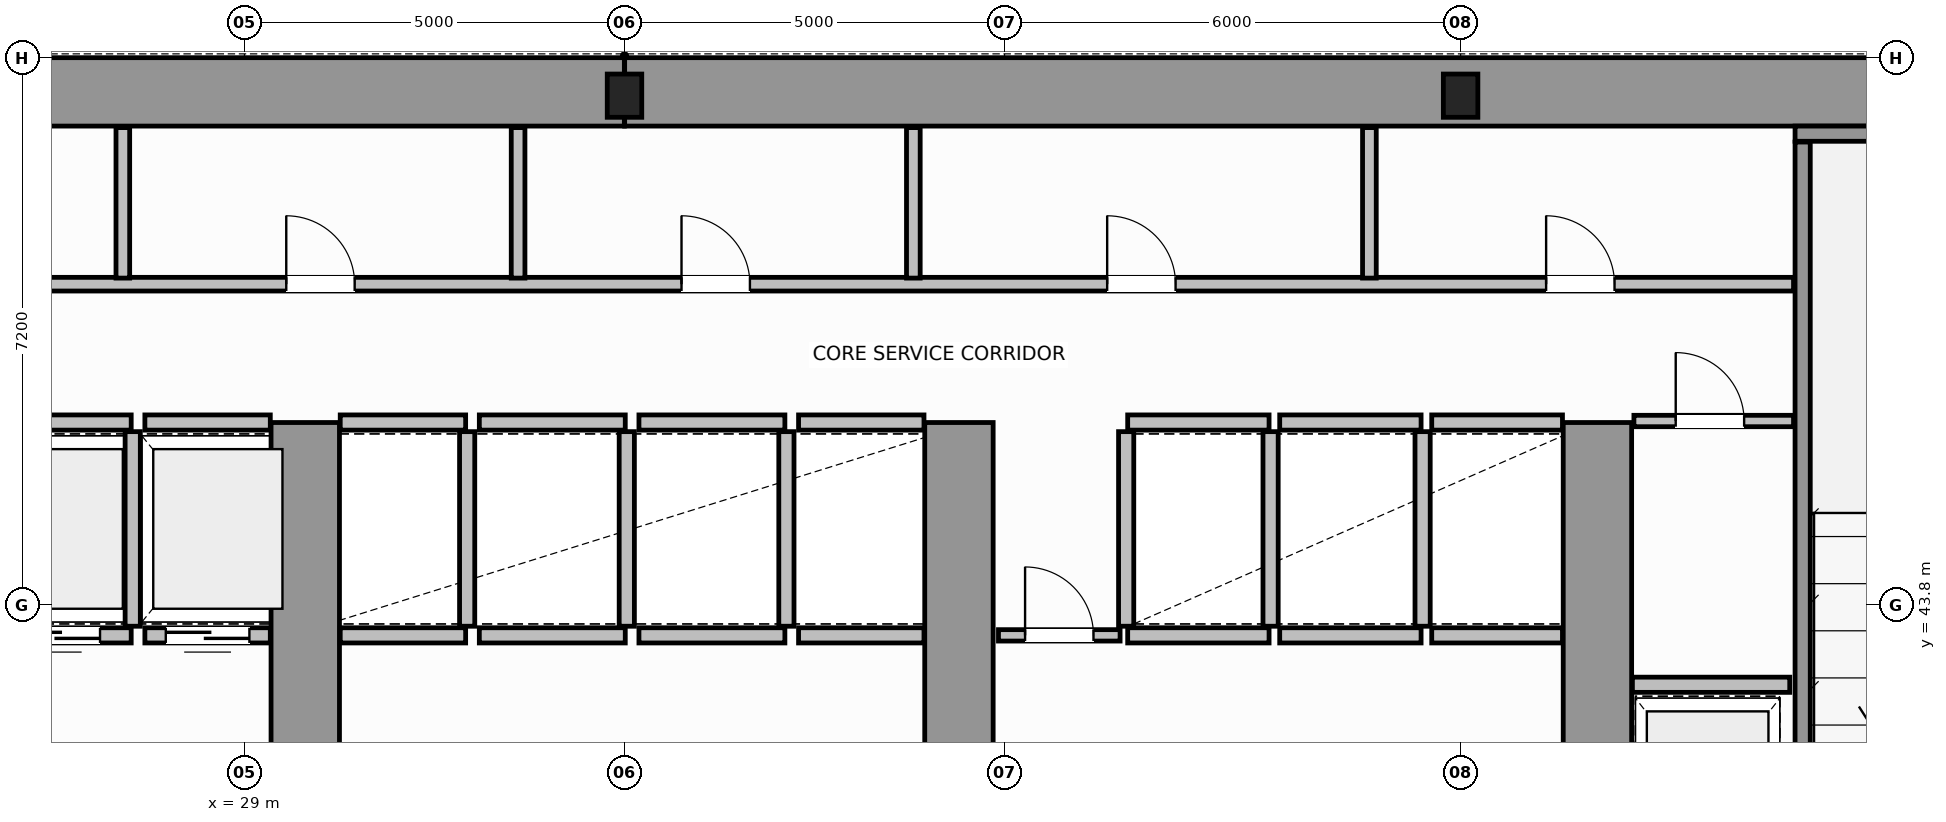
"""IFC4 building model, lengths in metres.
Left out: names, types, materials, properties, quantities, classifications, styles, units other than length and angle.
Written with IfcOpenShell. Run it as: python <this file> out.ifc"""

import sys

from ifc_helpers import new_model, si_unit, direction, frame, frame_2d, origin, origin_2d, place, context, subcontext, project, spatial, rectangle, i_section, extrude, source, transform, mapped, element, fill, save


model = new_model("IFC4")
c1 = context("Model", 3, precision=1e-05, world=origin(), true_north=direction((0.0, 1.0)))
c2 = subcontext(c1, "Body", "Model", "MODEL_VIEW")
j1 = project(units=[si_unit("LENGTHUNIT", "METRE"), si_unit("PLANEANGLEUNIT", "RADIAN")], contexts=[c1])
p1 = place(None, origin())
s1 = spatial("IfcSite", under=j1, at=p1, CompositionType="ELEMENT")
p2 = place(p1, origin())
s2 = spatial("IfcBuilding", under=s1, at=p2, CompositionType="ELEMENT")
p3 = place(p2, frame((0.0, 0.0, 18.8)))
s3 = spatial("IfcBuildingStorey", under=s2, at=p3, CompositionType="ELEMENT", Elevation=18.8)
m1 = source(origin(), c2, "Body", "SweptSolid", [
    extrude(i_section(OverallWidth=0.454, OverallDepth=0.569, WebThickness=0.078, FlangeThickness=0.08, FilletRadius=0.015, at=origin_2d()), origin(), (0.0, 0.0, 1.0), 3.8),
])
for number, where, z_axis, x_axis in (
    (1, (34.0, 50.5, 0.0), (0.0, 0.0, 1.0), (1.0, 0.0, 0.0)),
    (2, (45.0, 50.5, 0.0), (0.0, 0.0, 1.0), (1.0, 0.0, 0.0)),
):
    element("IfcColumn", number, at=place(p3, frame(where, z_axis=z_axis, x_axis=x_axis)), inside=s3, PredefinedType="COLUMN", context=c2, shape_type="MappedRepresentation", body=[
        mapped(m1, transform((0.0, 0.0, 0.0), scale=1.0)),
    ])
for number, where, z_axis, x_axis in (
    (3, (14.454, 50.55, 0.0), (0.0, 0.0, 1.0), (1.0, 0.0, 0.0)),
    (4, (34.002, 50.55, 0.0), (0.0, 0.0, 1.0), (1.0, 0.0, 0.0)),
):
    element("IfcWall", number, at=place(p3, frame(where, z_axis=z_axis, x_axis=x_axis)), inside=s3, PredefinedType="SHEAR", context=c2, shape_type="SweptSolid", body=[
        extrude(rectangle(XDim=19.544, YDim=0.9, at=frame_2d((9.772, 0.0))), origin(), (0.0, 0.0, 1.0), 3.8),
    ])
for number, where, z_axis, x_axis in (
    (5, (29.8, 36.97, 0.0), (0.0, 0.0, 1.0), (0.0, 1.0, 0.0)),
    (6, (38.4, 36.97, 0.0), (0.0, 0.0, 1.0), (0.0, 1.0, 0.0)),
    (7, (46.8, 36.97, 0.0), (0.0, 0.0, 1.0), (0.0, 1.0, 0.0)),
):
    element("IfcWall", number, at=place(p3, frame(where, z_axis=z_axis, x_axis=x_axis)), inside=s3, PredefinedType="SHEAR", context=c2, shape_type="SweptSolid", body=[
        extrude(rectangle(XDim=9.23, YDim=0.9, at=frame_2d((4.615, 0.0))), origin(), (0.0, 0.0, 1.0), 3.8),
    ])
p4 = place(p3, frame((49.4, 50.0, 0.0), z_axis=(0.0, 0.0, 1.0), x_axis=(1.0, 0.0, 0.0)))
e8 = element("IfcWall", 8, at=p4, inside=s3, PredefinedType="SOLIDWALL", context=c2, shape_type="SweptSolid", body=[
    extrude(rectangle(XDim=4.15, YDim=0.2, at=frame_2d((2.075, 0.0))), origin(), (0.0, 0.0, 1.0), 3.8),
])
p5 = place(p3, frame((49.5, 39.96, 0.0), z_axis=(0.0, 0.0, 1.0), x_axis=(0.0, 1.0, 0.0)))
e9 = element("IfcWall", 9, at=p5, inside=s3, PredefinedType="SOLIDWALL", context=c2, shape_type="SweptSolid", body=[
    extrude(rectangle(XDim=9.93, YDim=0.2, at=frame_2d((4.965, 0.0))), origin(), (0.0, 0.0, 1.0), 3.8),
])
p6 = place(p3, frame((25.59, 43.4, 0.0), z_axis=(0.0, 0.0, 1.0), x_axis=(1.0, 0.0, 0.0)))
e10 = element("IfcWall", 10, at=p6, inside=s3, PredefinedType="SOLIDWALL", context=c2, shape_type="SweptSolid", body=[
    extrude(rectangle(XDim=1.92, YDim=0.2, at=frame_2d((0.96, 0.0))), origin(), (0.0, 0.0, 1.0), 3.58),
])
p7 = place(p6, frame((0.41, 0.0, 0.0)))
e11 = element("IfcOpeningElement", 11, at=p7, cuts=e10, PredefinedType="OPENING", context=c2, shape_type="SweptSolid", body=[
    extrude(rectangle(XDim=1.1, YDim=2.15, at=frame_2d((0.55, 1.075))), frame((0.0, 0.11, 0.0), z_axis=(0.0, -1.0, 0.0), x_axis=(1.0, 0.0, 0.0)), (0.0, 0.0, 1.0), 0.22),
])
p8 = place(p3, frame((25.59, 46.2, 0.0), z_axis=(0.0, 0.0, 1.0), x_axis=(1.0, 0.0, 0.0)))
e12 = element("IfcWall", 12, at=p8, inside=s3, PredefinedType="SOLIDWALL", context=c2, shape_type="SweptSolid", body=[
    extrude(rectangle(XDim=1.92, YDim=0.2, at=frame_2d((0.96, 0.0))), origin(), (0.0, 0.0, 1.0), 3.58),
])
p9 = place(p3, frame((27.53, 43.52, 0.0), z_axis=(0.0, 0.0, 1.0), x_axis=(0.0, 1.0, 0.0)))
e13 = element("IfcWall", 13, at=p9, inside=s3, PredefinedType="SOLIDWALL", context=c2, shape_type="SweptSolid", body=[
    extrude(rectangle(XDim=2.56, YDim=0.2, at=frame_2d((1.28, 0.0))), origin(), (0.0, 0.0, 1.0), 3.58),
])
p10 = place(p3, frame((27.69, 43.4, 0.0), z_axis=(0.0, 0.0, 1.0), x_axis=(1.0, 0.0, 0.0)))
e14 = element("IfcWall", 14, at=p10, inside=s3, PredefinedType="SOLIDWALL", context=c2, shape_type="SweptSolid", body=[
    extrude(rectangle(XDim=1.65, YDim=0.2, at=frame_2d((0.825, 0.0))), origin(), (0.0, 0.0, 1.0), 3.58),
])
p11 = place(p10, frame((0.275, 0.0, 0.0)))
e15 = element("IfcOpeningElement", 15, at=p11, cuts=e14, PredefinedType="OPENING", context=c2, shape_type="SweptSolid", body=[
    extrude(rectangle(XDim=1.1, YDim=2.15, at=frame_2d((0.55, 1.075))), frame((0.0, 0.11, 0.0), z_axis=(0.0, -1.0, 0.0), x_axis=(1.0, 0.0, 0.0)), (0.0, 0.0, 1.0), 0.22),
])
p12 = place(p3, frame((27.69, 46.2, 0.0), z_axis=(0.0, 0.0, 1.0), x_axis=(1.0, 0.0, 0.0)))
e16 = element("IfcWall", 16, at=p12, inside=s3, PredefinedType="SOLIDWALL", context=c2, shape_type="SweptSolid", body=[
    extrude(rectangle(XDim=1.65, YDim=0.2, at=frame_2d((0.825, 0.0))), origin(), (0.0, 0.0, 1.0), 3.58),
])
for number, where, z_axis, x_axis in (
    (17, (30.26, 43.4, 0.0), (0.0, 0.0, 1.0), (1.0, 0.0, 0.0)),
    (18, (30.26, 46.2, 0.0), (0.0, 0.0, 1.0), (1.0, 0.0, 0.0)),
):
    element("IfcWall", number, at=place(p3, frame(where, z_axis=z_axis, x_axis=x_axis)), inside=s3, PredefinedType="SOLIDWALL", context=c2, shape_type="SweptSolid", body=[
        extrude(rectangle(XDim=1.65, YDim=0.2, at=frame_2d((0.825, 0.0))), origin(), (0.0, 0.0, 1.0), 3.58),
    ])
p13 = place(p3, frame((31.93, 43.52, 0.0), z_axis=(0.0, 0.0, 1.0), x_axis=(0.0, 1.0, 0.0)))
e19 = element("IfcWall", 19, at=p13, inside=s3, PredefinedType="SOLIDWALL", context=c2, shape_type="SweptSolid", body=[
    extrude(rectangle(XDim=2.56, YDim=0.2, at=frame_2d((1.28, 0.0))), origin(), (0.0, 0.0, 1.0), 3.58),
])
for number, where, z_axis, x_axis in (
    (20, (32.09, 43.4, 0.0), (0.0, 0.0, 1.0), (1.0, 0.0, 0.0)),
    (21, (32.09, 46.2, 0.0), (0.0, 0.0, 1.0), (1.0, 0.0, 0.0)),
):
    element("IfcWall", number, at=place(p3, frame(where, z_axis=z_axis, x_axis=x_axis)), inside=s3, PredefinedType="SOLIDWALL", context=c2, shape_type="SweptSolid", body=[
        extrude(rectangle(XDim=1.92, YDim=0.2, at=frame_2d((0.96, 0.0))), origin(), (0.0, 0.0, 1.0), 3.58),
    ])
p14 = place(p3, frame((34.03, 43.52, 0.0), z_axis=(0.0, 0.0, 1.0), x_axis=(0.0, 1.0, 0.0)))
e22 = element("IfcWall", 22, at=p14, inside=s3, PredefinedType="SOLIDWALL", context=c2, shape_type="SweptSolid", body=[
    extrude(rectangle(XDim=2.56, YDim=0.2, at=frame_2d((1.28, 0.0))), origin(), (0.0, 0.0, 1.0), 3.58),
])
for number, where, z_axis, x_axis in (
    (23, (34.19, 43.4, 0.0), (0.0, 0.0, 1.0), (1.0, 0.0, 0.0)),
    (24, (34.19, 46.2, 0.0), (0.0, 0.0, 1.0), (1.0, 0.0, 0.0)),
):
    element("IfcWall", number, at=place(p3, frame(where, z_axis=z_axis, x_axis=x_axis)), inside=s3, PredefinedType="SOLIDWALL", context=c2, shape_type="SweptSolid", body=[
        extrude(rectangle(XDim=1.92, YDim=0.2, at=frame_2d((0.96, 0.0))), origin(), (0.0, 0.0, 1.0), 3.58),
    ])
p15 = place(p3, frame((36.13, 43.52, 0.0), z_axis=(0.0, 0.0, 1.0), x_axis=(0.0, 1.0, 0.0)))
e25 = element("IfcWall", 25, at=p15, inside=s3, PredefinedType="SOLIDWALL", context=c2, shape_type="SweptSolid", body=[
    extrude(rectangle(XDim=2.56, YDim=0.2, at=frame_2d((1.28, 0.0))), origin(), (0.0, 0.0, 1.0), 3.58),
])
for number, where, z_axis, x_axis in (
    (26, (36.29, 43.4, 0.0), (0.0, 0.0, 1.0), (1.0, 0.0, 0.0)),
    (27, (36.29, 46.2, 0.0), (0.0, 0.0, 1.0), (1.0, 0.0, 0.0)),
):
    element("IfcWall", number, at=place(p3, frame(where, z_axis=z_axis, x_axis=x_axis)), inside=s3, PredefinedType="SOLIDWALL", context=c2, shape_type="SweptSolid", body=[
        extrude(rectangle(XDim=1.65, YDim=0.2, at=frame_2d((0.825, 0.0))), origin(), (0.0, 0.0, 1.0), 3.58),
    ])
for number, where, z_axis, x_axis in (
    (28, (40.62, 43.4, 0.0), (0.0, 0.0, 1.0), (1.0, 0.0, 0.0)),
    (29, (40.62, 46.2, 0.0), (0.0, 0.0, 1.0), (1.0, 0.0, 0.0)),
):
    element("IfcWall", number, at=place(p3, frame(where, z_axis=z_axis, x_axis=x_axis)), inside=s3, PredefinedType="SOLIDWALL", context=c2, shape_type="SweptSolid", body=[
        extrude(rectangle(XDim=1.86, YDim=0.2, at=frame_2d((0.93, 0.0))), origin(), (0.0, 0.0, 1.0), 3.58),
    ])
for number, where, z_axis, x_axis in (
    (30, (40.6, 43.52, 0.0), (0.0, 0.0, 1.0), (0.0, 1.0, 0.0)),
    (31, (42.5, 43.52, 0.0), (0.0, 0.0, 1.0), (0.0, 1.0, 0.0)),
):
    element("IfcWall", number, at=place(p3, frame(where, z_axis=z_axis, x_axis=x_axis)), inside=s3, PredefinedType="SOLIDWALL", context=c2, shape_type="SweptSolid", body=[
        extrude(rectangle(XDim=2.56, YDim=0.2, at=frame_2d((1.28, 0.0))), origin(), (0.0, 0.0, 1.0), 3.58),
    ])
for number, where, z_axis, x_axis in (
    (32, (42.62, 43.4, 0.0), (0.0, 0.0, 1.0), (1.0, 0.0, 0.0)),
    (33, (42.62, 46.2, 0.0), (0.0, 0.0, 1.0), (1.0, 0.0, 0.0)),
):
    element("IfcWall", number, at=place(p3, frame(where, z_axis=z_axis, x_axis=x_axis)), inside=s3, PredefinedType="SOLIDWALL", context=c2, shape_type="SweptSolid", body=[
        extrude(rectangle(XDim=1.86, YDim=0.2, at=frame_2d((0.93, 0.0))), origin(), (0.0, 0.0, 1.0), 3.58),
    ])
p16 = place(p3, frame((44.5, 43.52, 0.0), z_axis=(0.0, 0.0, 1.0), x_axis=(0.0, 1.0, 0.0)))
e34 = element("IfcWall", 34, at=p16, inside=s3, PredefinedType="SOLIDWALL", context=c2, shape_type="SweptSolid", body=[
    extrude(rectangle(XDim=2.56, YDim=0.2, at=frame_2d((1.28, 0.0))), origin(), (0.0, 0.0, 1.0), 3.58),
])
for number, where, z_axis, x_axis in (
    (35, (44.62, 43.4, 0.0), (0.0, 0.0, 1.0), (1.0, 0.0, 0.0)),
    (36, (44.62, 46.2, 0.0), (0.0, 0.0, 1.0), (1.0, 0.0, 0.0)),
):
    element("IfcWall", number, at=place(p3, frame(where, z_axis=z_axis, x_axis=x_axis)), inside=s3, PredefinedType="SOLIDWALL", context=c2, shape_type="SweptSolid", body=[
        extrude(rectangle(XDim=1.72, YDim=0.2, at=frame_2d((0.86, 0.0))), origin(), (0.0, 0.0, 1.0), 3.58),
    ])
p17 = place(p3, frame((47.26, 42.75, 0.0), z_axis=(0.0, 0.0, 1.0), x_axis=(1.0, 0.0, 0.0)))
e37 = element("IfcWall", 37, at=p17, inside=s3, PredefinedType="SOLIDWALL", context=c2, shape_type="SweptSolid", body=[
    extrude(rectangle(XDim=2.07, YDim=0.2, at=frame_2d((1.035, 0.0))), origin(), (0.0, 0.0, 1.0), 3.58),
])
p18 = place(p3, frame((47.28, 46.22, 0.0), z_axis=(0.0, 0.0, 1.0), x_axis=(1.0, 0.0, 0.0)))
e38 = element("IfcWall", 38, at=p18, inside=s3, PredefinedType="PARTITIONING", context=c2, shape_type="SweptSolid", body=[
    extrude(rectangle(XDim=2.1, YDim=0.15, at=frame_2d((1.05, 0.0))), origin(), (0.0, 0.0, 1.0), 3.58),
])
p19 = place(p18, frame((0.55, 0.0, 0.0)))
e39 = element("IfcOpeningElement", 39, at=p19, cuts=e38, PredefinedType="OPENING", context=c2, shape_type="SweptSolid", body=[
    extrude(rectangle(XDim=0.9, YDim=2.1, at=frame_2d((0.45, 1.05))), frame((0.0, 0.085, 0.0), z_axis=(0.0, -1.0, 0.0), x_axis=(1.0, 0.0, 0.0)), (0.0, 0.0, 1.0), 0.17),
])
p20 = place(p3, frame((38.92, 43.4, 0.0), z_axis=(0.0, 0.0, 1.0), x_axis=(1.0, 0.0, 0.0)))
e40 = element("IfcWall", 40, at=p20, inside=s3, PredefinedType="PARTITIONING", context=c2, shape_type="SweptSolid", body=[
    extrude(rectangle(XDim=1.6, YDim=0.15, at=frame_2d((0.8, 0.0))), origin(), (0.0, 0.0, 1.0), 3.58),
])
p21 = place(p20, frame((0.35, 0.0, 0.0)))
e41 = element("IfcOpeningElement", 41, at=p21, cuts=e40, PredefinedType="OPENING", context=c2, shape_type="SweptSolid", body=[
    extrude(rectangle(XDim=0.9, YDim=2.1, at=frame_2d((0.45, 1.05))), frame((0.0, 0.085, 0.0), z_axis=(0.0, -1.0, 0.0), x_axis=(1.0, 0.0, 0.0)), (0.0, 0.0, 1.0), 0.17),
])
p22 = place(p3, frame((18.62, 48.02, 0.0), z_axis=(0.0, 0.0, 1.0), x_axis=(1.0, 0.0, 0.0)))
e42 = element("IfcWall", 42, at=p22, inside=s3, PredefinedType="PLUMBINGWALL", context=c2, shape_type="SweptSolid", body=[
    extrude(rectangle(XDim=30.76, YDim=0.18, at=frame_2d((15.38, 0.0))), origin(), (0.0, 0.0, 1.0), 3.58),
])
p23 = place(p22, frame((1.655, 0.0, 0.0)))
e43 = element("IfcOpeningElement", 43, at=p23, cuts=e42, PredefinedType="OPENING", context=c2, shape_type="SweptSolid", body=[
    extrude(rectangle(XDim=0.9, YDim=2.15, at=frame_2d((0.45, 1.075))), frame((0.0, 0.1, 0.0), z_axis=(0.0, -1.0, 0.0), x_axis=(1.0, 0.0, 0.0)), (0.0, 0.0, 1.0), 0.2),
])
p24 = place(p22, frame((6.03, 0.0, 0.0)))
e44 = element("IfcOpeningElement", 44, at=p24, cuts=e42, PredefinedType="OPENING", context=c2, shape_type="SweptSolid", body=[
    extrude(rectangle(XDim=0.9, YDim=2.15, at=frame_2d((0.45, 1.075))), frame((0.0, 0.1, 0.0), z_axis=(0.0, -1.0, 0.0), x_axis=(1.0, 0.0, 0.0)), (0.0, 0.0, 1.0), 0.2),
])
p25 = place(p22, frame((10.93, 0.0, 0.0)))
e45 = element("IfcOpeningElement", 45, at=p25, cuts=e42, PredefinedType="OPENING", context=c2, shape_type="SweptSolid", body=[
    extrude(rectangle(XDim=0.9, YDim=2.15, at=frame_2d((0.45, 1.075))), frame((0.0, 0.1, 0.0), z_axis=(0.0, -1.0, 0.0), x_axis=(1.0, 0.0, 0.0)), (0.0, 0.0, 1.0), 0.2),
])
p26 = place(p22, frame((16.13, 0.0, 0.0)))
e46 = element("IfcOpeningElement", 46, at=p26, cuts=e42, PredefinedType="OPENING", context=c2, shape_type="SweptSolid", body=[
    extrude(rectangle(XDim=0.9, YDim=2.15, at=frame_2d((0.45, 1.075))), frame((0.0, 0.1, 0.0), z_axis=(0.0, -1.0, 0.0), x_axis=(1.0, 0.0, 0.0)), (0.0, 0.0, 1.0), 0.2),
])
p27 = place(p22, frame((21.73, 0.0, 0.0)))
e47 = element("IfcOpeningElement", 47, at=p27, cuts=e42, PredefinedType="OPENING", context=c2, shape_type="SweptSolid", body=[
    extrude(rectangle(XDim=0.9, YDim=2.15, at=frame_2d((0.45, 1.075))), frame((0.0, 0.1, 0.0), z_axis=(0.0, -1.0, 0.0), x_axis=(1.0, 0.0, 0.0)), (0.0, 0.0, 1.0), 0.2),
])
p28 = place(p22, frame((27.505, 0.0, 0.0)))
e48 = element("IfcOpeningElement", 48, at=p28, cuts=e42, PredefinedType="OPENING", context=c2, shape_type="SweptSolid", body=[
    extrude(rectangle(XDim=0.9, YDim=2.15, at=frame_2d((0.45, 1.075))), frame((0.0, 0.1, 0.0), z_axis=(0.0, -1.0, 0.0), x_axis=(1.0, 0.0, 0.0)), (0.0, 0.0, 1.0), 0.2),
])
for number, where, z_axis, x_axis in (
    (49, (27.4, 48.1, 0.0), (0.0, 0.0, 1.0), (0.0, 1.0, 0.0)),
    (50, (32.6, 48.1, 0.0), (0.0, 0.0, 1.0), (0.0, 1.0, 0.0)),
    (51, (37.8, 48.1, 0.0), (0.0, 0.0, 1.0), (0.0, 1.0, 0.0)),
    (52, (43.8, 48.1, 0.0), (0.0, 0.0, 1.0), (0.0, 1.0, 0.0)),
):
    element("IfcWall", number, at=place(p3, frame(where, z_axis=z_axis, x_axis=x_axis)), inside=s3, PredefinedType="PLUMBINGWALL", context=c2, shape_type="SweptSolid", body=[
        extrude(rectangle(XDim=1.98, YDim=0.18, at=frame_2d((0.99, 0.0))), origin(), (0.0, 0.0, 1.0), 3.58),
    ])
m2 = source(origin(), c2, "Body", "SweptSolid", [
    extrude(rectangle(XDim=1.1, YDim=2.15, at=frame_2d((0.55, 1.075))), frame((0.0, 0.025, 0.0), z_axis=(0.0, -1.0, 0.0), x_axis=(1.0, 0.0, 0.0)), (0.0, 0.0, 1.0), 0.05),
])
p29 = place(p7, origin())
e53 = element("IfcDoor", 53, at=p29, inside=s3, OperationType="DOUBLE_DOOR_SLIDING", PredefinedType="DOOR", context=c2, shape_type="MappedRepresentation", body=[
    mapped(m2, transform((0.0, 0.0, 0.0), scale=1.0)),
])
fill(e11, e53)
p30 = place(p11, origin())
e54 = element("IfcDoor", 54, at=p30, inside=s3, OperationType="DOUBLE_DOOR_SLIDING", PredefinedType="DOOR", context=c2, shape_type="MappedRepresentation", body=[
    mapped(m2, transform((0.0, 0.0, 0.0), scale=1.0)),
])
fill(e15, e54)
m3 = source(origin(), c2, "Body", "SweptSolid", [
    extrude(rectangle(XDim=0.9, YDim=2.1, at=frame_2d((0.45, 1.05))), frame((0.0, 0.025, 0.0), z_axis=(0.0, -1.0, 0.0), x_axis=(1.0, 0.0, 0.0)), (0.0, 0.0, 1.0), 0.05),
])
p31 = place(p19, origin())
e55 = element("IfcDoor", 55, at=p31, inside=s3, OperationType="SINGLE_SWING_RIGHT", PredefinedType="DOOR", context=c2, shape_type="MappedRepresentation", body=[
    mapped(m3, transform((0.0, 0.0, 0.0), scale=1.0)),
])
fill(e39, e55)
p32 = place(p21, origin())
e56 = element("IfcDoor", 56, at=p32, inside=s3, OperationType="SINGLE_SWING_LEFT", PredefinedType="DOOR", context=c2, shape_type="MappedRepresentation", body=[
    mapped(m3, transform((0.0, 0.0, 0.0), scale=1.0)),
])
fill(e41, e56)
m4 = source(origin(), c2, "Body", "SweptSolid", [
    extrude(rectangle(XDim=0.9, YDim=2.15, at=frame_2d((0.45, 1.075))), frame((0.0, 0.025, 0.0), z_axis=(0.0, -1.0, 0.0), x_axis=(1.0, 0.0, 0.0)), (0.0, 0.0, 1.0), 0.05),
])
p33 = place(p25, origin())
e57 = element("IfcDoor", 57, at=p33, inside=s3, OperationType="SINGLE_SWING_LEFT", PredefinedType="DOOR", context=c2, shape_type="MappedRepresentation", body=[
    mapped(m4, transform((0.0, 0.0, 0.0), scale=1.0)),
])
fill(e45, e57)
p34 = place(p26, origin())
e58 = element("IfcDoor", 58, at=p34, inside=s3, OperationType="SINGLE_SWING_RIGHT", PredefinedType="DOOR", context=c2, shape_type="MappedRepresentation", body=[
    mapped(m4, transform((0.0, 0.0, 0.0), scale=1.0)),
])
fill(e46, e58)
p35 = place(p27, origin())
e59 = element("IfcDoor", 59, at=p35, inside=s3, OperationType="SINGLE_SWING_LEFT", PredefinedType="DOOR", context=c2, shape_type="MappedRepresentation", body=[
    mapped(m4, transform((0.0, 0.0, 0.0), scale=1.0)),
])
fill(e47, e59)
p36 = place(p28, origin())
e60 = element("IfcDoor", 60, at=p36, inside=s3, OperationType="SINGLE_SWING_RIGHT", PredefinedType="DOOR", context=c2, shape_type="MappedRepresentation", body=[
    mapped(m4, transform((0.0, 0.0, 0.0), scale=1.0)),
])
fill(e48, e60)
save(model, sys.argv[1])
